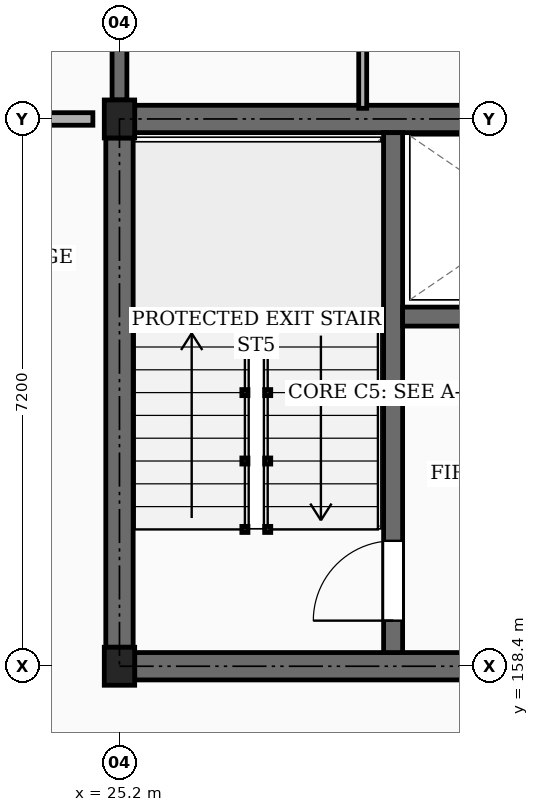
"""IFC4 building model, lengths in metres.
Left out: names, types, materials, properties, quantities, classifications, styles, units other than length and angle.
Written with IfcOpenShell. Run it as: python <this file> out.ifc"""

import sys

from ifc_helpers import new_model, si_unit, direction, frame, frame_2d, origin, origin_2d, place, context, subcontext, project, spatial, rectangle, extrude, element, fill, save


model = new_model("IFC4")
c1 = context("Model", 3, precision=1e-05, world=origin(), true_north=direction((0.0, 1.0)))
c2 = subcontext(c1, "Body", "Model", "MODEL_VIEW")
j1 = project(units=[si_unit("LENGTHUNIT", "METRE"), si_unit("PLANEANGLEUNIT", "RADIAN")], contexts=[c1])
p1 = place(None, origin())
s1 = spatial("IfcSite", under=j1, at=p1, CompositionType="ELEMENT")
p2 = place(p1, origin())
s2 = spatial("IfcBuilding", under=s1, at=p2, CompositionType="ELEMENT")
p3 = place(p2, frame((0.0, 0.0, 39.15)))
s3 = spatial("IfcBuildingStorey", under=s2, at=p3, CompositionType="ELEMENT", Elevation=39.15)
for number, where, z_axis, x_axis in (
    (1, (25.2, 158.4, 0.0), (0.0, 0.0, 1.0), (1.0, 0.0, 0.0)),
    (2, (25.2, 165.6, 0.0), (0.0, 0.0, 1.0), (1.0, 0.0, 0.0)),
):
    element("IfcColumn", number, at=place(p3, frame(where, z_axis=z_axis, x_axis=x_axis)), inside=s3, PredefinedType="COLUMN", context=c2, shape_type="SweptSolid", body=[
        extrude(rectangle(XDim=0.4, YDim=0.5, at=origin_2d()), origin(), (0.0, 0.0, 1.0), 3.15),
    ])
p4 = place(p3, frame((25.2, 165.85, 0.0), z_axis=(0.0, 0.0, 1.0), x_axis=(0.0, 1.0, 0.0)))
e3 = element("IfcWall", 3, at=p4, inside=s3, PredefinedType="SOLIDWALL", context=c2, shape_type="SweptSolid", body=[
    extrude(rectangle(XDim=6.725, YDim=0.195, at=frame_2d((3.362, 0.0))), origin(), (0.0, 0.0, 1.0), 2.185),
])
p5 = place(p4, frame((4.15, 0.0, 0.0)))
e4 = element("IfcOpeningElement", 4, at=p5, cuts=e3, PredefinedType="OPENING", context=c2, shape_type="SweptSolid", body=[
    extrude(rectangle(XDim=0.98, YDim=2.12, at=frame_2d((0.49, 1.06))), frame((0.0, 0.107, 0.0), z_axis=(0.0, -1.0, 0.0), x_axis=(1.0, 0.0, 0.0)), (0.0, 0.0, 1.0), 0.215),
])
p6 = place(p3, frame((25.2, 158.65, 0.0), z_axis=(0.0, 0.0, 1.0), x_axis=(0.0, 1.0, 0.0)))
e5 = element("IfcWall", 5, at=p6, inside=s3, PredefinedType="SHEAR", context=c2, shape_type="SweptSolid", body=[
    extrude(rectangle(XDim=6.7, YDim=0.36, at=frame_2d((3.35, 0.0))), origin(), (0.0, 0.0, 1.0), 2.885),
])
p7 = place(p3, frame((25.4, 165.6, 0.0), z_axis=(0.0, 0.0, 1.0), x_axis=(1.0, 0.0, 0.0)))
e6 = element("IfcWall", 6, at=p7, inside=s3, PredefinedType="SHEAR", context=c2, shape_type="SweptSolid", body=[
    extrude(rectangle(XDim=6.8, YDim=0.36, at=frame_2d((3.4, 0.0))), origin(), (0.0, 0.0, 1.0), 2.885),
])
p8 = place(p3, frame((25.4, 158.4, 0.0), z_axis=(0.0, 0.0, 1.0), x_axis=(1.0, 0.0, 0.0)))
e7 = element("IfcWall", 7, at=p8, inside=s3, PredefinedType="SHEAR", context=c2, shape_type="SweptSolid", body=[
    extrude(rectangle(XDim=6.8, YDim=0.36, at=frame_2d((3.4, 0.0))), origin(), (0.0, 0.0, 1.0), 2.885),
])
p9 = place(p8, frame((4.55, 0.0, 0.0)))
e8 = element("IfcOpeningElement", 8, at=p9, cuts=e7, PredefinedType="OPENING", context=c2, shape_type="SweptSolid", body=[
    extrude(rectangle(XDim=1.1, YDim=2.15, at=frame_2d((0.55, 1.075))), frame((0.0, 0.19, 0.0), z_axis=(0.0, -1.0, 0.0), x_axis=(1.0, 0.0, 0.0)), (0.0, 0.0, 1.0), 0.38),
])
p10 = place(p3, frame((28.8, 158.58, 0.0), z_axis=(0.0, 0.0, 1.0), x_axis=(0.0, 1.0, 0.0)))
e9 = element("IfcWall", 9, at=p10, inside=s3, PredefinedType="SHEAR", context=c2, shape_type="SweptSolid", body=[
    extrude(rectangle(XDim=6.84, YDim=0.25, at=frame_2d((3.42, 0.0))), origin(), (0.0, 0.0, 1.0), 2.885),
])
p11 = place(p10, frame((0.42, 0.0, 0.0)))
e10 = element("IfcOpeningElement", 10, at=p11, cuts=e9, PredefinedType="OPENING", context=c2, shape_type="SweptSolid", body=[
    extrude(rectangle(XDim=1.05, YDim=2.15, at=frame_2d((0.525, 1.075))), frame((0.0, 0.135, 0.0), z_axis=(0.0, -1.0, 0.0), x_axis=(1.0, 0.0, 0.0)), (0.0, 0.0, 1.0), 0.27),
])
p12 = place(p3, frame((28.925, 163.0, 0.0), z_axis=(0.0, 0.0, 1.0), x_axis=(1.0, 0.0, 0.0)))
e11 = element("IfcWall", 11, at=p12, inside=s3, PredefinedType="SHEAR", context=c2, shape_type="SweptSolid", body=[
    extrude(rectangle(XDim=3.295, YDim=0.25, at=frame_2d((1.647, 0.0))), origin(), (0.0, 0.0, 1.0), 2.885),
])
p13 = place(p12, frame((1.1, 0.0, 0.0)))
e12 = element("IfcOpeningElement", 12, at=p13, cuts=e11, PredefinedType="OPENING", context=c2, shape_type="SweptSolid", body=[
    extrude(rectangle(XDim=1.1, YDim=2.2, at=frame_2d((0.55, 1.1))), frame((0.0, 0.135, 0.0), z_axis=(0.0, -1.0, 0.0), x_axis=(1.0, 0.0, 0.0)), (0.0, 0.0, 1.0), 0.27),
])
p14 = place(p3, frame((18.35, 165.6, 0.0), z_axis=(0.0, 0.0, 1.0), x_axis=(1.0, 0.0, 0.0)))
e13 = element("IfcWall", 13, at=p14, inside=s3, PredefinedType="PARTITIONING", context=c2, shape_type="SweptSolid", body=[
    extrude(rectangle(XDim=6.5, YDim=0.165, at=frame_2d((3.25, 0.0))), origin(), (0.0, 0.0, 1.0), 2.32),
])
p15 = place(p14, frame((1.0, 0.0, 0.0)))
e14 = element("IfcOpeningElement", 14, at=p15, cuts=e13, PredefinedType="OPENING", context=c2, shape_type="SweptSolid", body=[
    extrude(rectangle(XDim=0.94, YDim=2.12, at=frame_2d((0.47, 1.06))), frame((0.0, 0.093, 0.0), z_axis=(0.0, -1.0, 0.0), x_axis=(1.0, 0.0, 0.0)), (0.0, 0.0, 1.0), 0.185),
])
p16 = place(p3, frame((28.4, 165.74, 0.0), z_axis=(0.0, 0.0, 1.0), x_axis=(0.0, 1.0, 0.0)))
e15 = element("IfcWall", 15, at=p16, inside=s3, PredefinedType="PARTITIONING", context=c2, shape_type="SweptSolid", body=[
    extrude(rectangle(XDim=3.39, YDim=0.105, at=frame_2d((1.695, 0.0))), origin(), (0.0, 0.0, 1.0), 2.32),
])
p17 = place(p11, origin())
e16 = element("IfcDoor", 16, at=p17, inside=s3, OperationType="SINGLE_SWING_LEFT", PredefinedType="DOOR", context=c2, shape_type="SweptSolid", body=[
    extrude(rectangle(XDim=1.05, YDim=2.15, at=frame_2d((0.525, 1.075))), frame((0.0, 0.025, 0.0), z_axis=(0.0, -1.0, 0.0), x_axis=(1.0, 0.0, 0.0)), (0.0, 0.0, 1.0), 0.05),
])
fill(e10, e16)
save(model, sys.argv[1])
